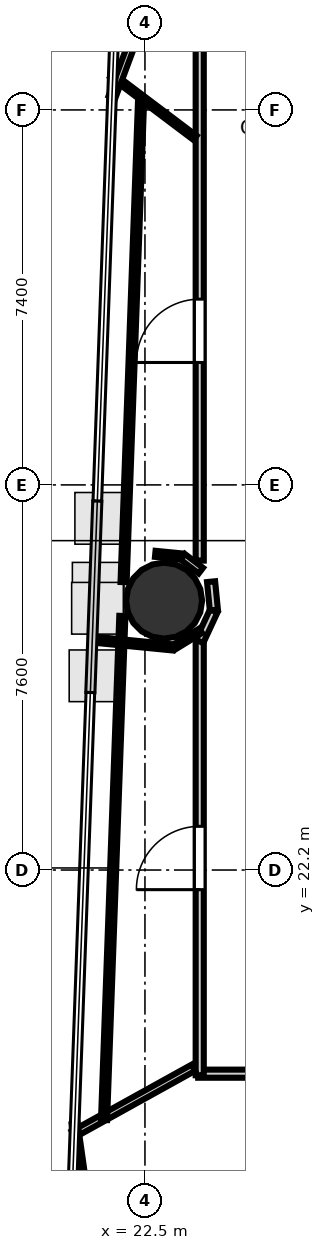
"""IFC4 building model, lengths in metres.
Left out: names, types, materials, properties, quantities, classifications, styles, units other than length and angle.
Written with IfcOpenShell. Run it as: python <this file> out.ifc"""

import sys

from ifc_helpers import new_model, si_unit, direction, frame, frame_2d, origin, origin_2d, place, context, subcontext, project, spatial, rectangle, hollow_circle, extrude, element, fill, save


model = new_model("IFC4")
c1 = context("Model", 3, precision=1e-05, world=origin(), true_north=direction((0.0, 1.0)))
c2 = subcontext(c1, "Body", "Model", "MODEL_VIEW")
j1 = project(units=[si_unit("LENGTHUNIT", "METRE"), si_unit("PLANEANGLEUNIT", "RADIAN")], contexts=[c1])
p1 = place(None, origin())
s1 = spatial("IfcSite", under=j1, at=p1, CompositionType="ELEMENT")
p2 = place(p1, origin())
s2 = spatial("IfcBuilding", under=s1, at=p2, CompositionType="ELEMENT")
p3 = place(p2, frame((0.0, 0.0, 134.8)))
s3 = spatial("IfcBuildingStorey", under=s2, at=p3, CompositionType="ELEMENT", Elevation=134.8)
p4 = place(p3, frame((22.878, 27.516, 0.0), z_axis=(0.0, 0.0, 1.0), x_axis=(1.0, 0.0, 0.0)))
e1 = element("IfcColumn", 1, at=p4, inside=s3, PredefinedType="COLUMN", context=c2, shape_type="SweptSolid", body=[
    extrude(hollow_circle(Radius=0.75, WallThickness=0.036, at=origin_2d()), origin(), (0.0, 0.0, 1.0), 3.7),
])
p5 = place(p3, frame((23.581, 28.307, 0.0), z_axis=(0.0, 0.0, 1.0), x_axis=(0.0, 1.0, 0.0)))
e2 = element("IfcWall", 2, at=p5, inside=s3, PredefinedType="PARTITIONING", context=c2, shape_type="SweptSolid", body=[
    extrude(rectangle(XDim=11.481, YDim=0.16, at=frame_2d((5.741, 0.0))), origin(), (0.0, 0.0, 1.0), 2.72),
])
p6 = place(p5, frame((3.909, 0.0, 0.0)))
e3 = element("IfcOpeningElement", 3, at=p6, cuts=e2, PredefinedType="OPENING", context=c2, shape_type="SweptSolid", body=[
    extrude(rectangle(XDim=1.25, YDim=2.2, at=frame_2d((0.625, 1.1))), frame((0.0, 0.09, 0.0), z_axis=(0.0, -1.0, 0.0), x_axis=(1.0, 0.0, 0.0)), (0.0, 0.0, 1.0), 0.18),
])
p7 = place(p3, frame((33.32, 18.181, 0.0), z_axis=(0.0, 0.0, 1.0), x_axis=(-1.0, 0.0, 0.0)))
e4 = element("IfcWall", 4, at=p7, inside=s3, PredefinedType="PARTITIONING", context=c2, shape_type="SweptSolid", body=[
    extrude(rectangle(XDim=9.77, YDim=0.16, at=frame_2d((4.885, 0.0))), origin(), (0.0, 0.0, 1.0), 2.72),
])
p8 = place(p7, frame((5.52, 0.0, 0.0)))
e5 = element("IfcOpeningElement", 5, at=p8, cuts=e4, PredefinedType="OPENING", context=c2, shape_type="SweptSolid", body=[
    extrude(rectangle(XDim=1.25, YDim=2.2, at=frame_2d((0.625, 1.1))), frame((0.0, 0.09, 0.0), z_axis=(0.0, -1.0, 0.0), x_axis=(1.0, 0.0, 0.0)), (0.0, 0.0, 1.0), 0.18),
])
p9 = place(p3, frame((23.581, 18.15, 0.0), z_axis=(0.0, 0.0, 1.0), x_axis=(0.0, 1.0, 0.0)))
e6 = element("IfcWall", 6, at=p9, inside=s3, PredefinedType="PARTITIONING", context=c2, shape_type="SweptSolid", body=[
    extrude(rectangle(XDim=8.575, YDim=0.16, at=frame_2d((4.288, 0.0))), origin(), (0.0, 0.0, 1.0), 2.72),
])
p10 = place(p9, frame((3.663, 0.0, 0.0)))
e7 = element("IfcOpeningElement", 7, at=p10, cuts=e6, PredefinedType="OPENING", context=c2, shape_type="SweptSolid", body=[
    extrude(rectangle(XDim=1.25, YDim=2.2, at=frame_2d((0.625, 1.1))), frame((0.0, 0.09, 0.0), z_axis=(0.0, -1.0, 0.0), x_axis=(1.0, 0.0, 0.0)), (0.0, 0.0, 1.0), 0.18),
])
p11 = place(p3, frame((23.578, 26.712, 0.0), z_axis=(0.0, 0.0, 1.0), x_axis=(0.421251946418, 0.906943657367, 0.0)))
e8 = element("IfcWall", 8, at=p11, inside=s3, PredefinedType="PARTITIONING", context=c2, shape_type="SweptSolid", body=[
    extrude(rectangle(XDim=0.663, YDim=0.16, at=frame_2d((0.332, 0.0))), origin(), (0.0, 0.0, 1.0), 2.72),
])
p12 = place(p3, frame((23.86, 27.33, 0.0), z_axis=(0.0, 0.0, 1.0), x_axis=(-0.098000919071, 0.995186324193, 0.0)))
e9 = element("IfcWall", 9, at=p12, inside=s3, PredefinedType="PARTITIONING", context=c2, shape_type="SweptSolid", body=[
    extrude(rectangle(XDim=0.563, YDim=0.16, at=frame_2d((0.281, 0.0))), origin(), (0.0, 0.0, 1.0), 2.72),
])
p13 = place(p3, frame((23.455, 18.298, 0.0), z_axis=(0.0, 0.0, 1.0), x_axis=(-0.874671872236, -0.484715499977, 0.0)))
e10 = element("IfcWall", 10, at=p13, inside=s3, PredefinedType="PARTITIONING", context=c2, shape_type="SweptSolid", body=[
    extrude(rectangle(XDim=2.705, YDim=0.14, at=frame_2d((1.353, 0.0))), origin(), (0.0, 0.0, 1.0), 2.72),
])
p14 = place(p3, frame((21.693, 17.268, 0.0), z_axis=(0.0, 0.0, 1.0), x_axis=(0.036303985609, 0.999340793038, 0.0)))
e11 = element("IfcWall", 11, at=p14, inside=s3, PredefinedType="PARTITIONING", context=c2, shape_type="SweptSolid", body=[
    extrude(rectangle(XDim=9.953, YDim=0.12, at=frame_2d((4.977, 0.0))), origin(), (0.0, 0.0, 1.0), 2.72),
])
p15 = place(p3, frame((21.441, 26.751, 0.0), z_axis=(0.0, 0.0, 1.0), x_axis=(0.995173548937, -0.09813056352, 0.0)))
e12 = element("IfcWall", 12, at=p15, inside=s3, PredefinedType="PARTITIONING", context=c2, shape_type="SweptSolid", body=[
    extrude(rectangle(XDim=1.62, YDim=0.12, at=frame_2d((0.81, 0.0))), origin(), (0.0, 0.0, 1.0), 2.72),
])
p16 = place(p3, frame((23.072, 26.597, 0.0), z_axis=(0.0, 0.0, 1.0), x_axis=(0.851779925453, 0.523899760064, 0.0)))
e13 = element("IfcWall", 13, at=p16, inside=s3, PredefinedType="PARTITIONING", context=c2, shape_type="SweptSolid", body=[
    extrude(rectangle(XDim=0.62, YDim=0.105, at=frame_2d((0.31, 0.0))), origin(), (0.0, 0.0, 1.0), 2.72),
])
p17 = place(p3, frame((23.489, 36.65, 0.0), z_axis=(0.0, 0.0, 1.0), x_axis=(-0.798656999973, 0.601786503998, 0.0)))
e14 = element("IfcWall", 14, at=p17, inside=s3, PredefinedType="PARTITIONING", context=c2, shape_type="SweptSolid", body=[
    extrude(rectangle(XDim=2.054, YDim=0.105, at=frame_2d((1.027, 0.0))), origin(), (0.0, 0.0, 1.0), 2.72),
])
p18 = place(p3, frame((21.85, 37.456, 0.0), z_axis=(0.0, 0.0, 1.0), x_axis=(0.348320249102, 0.937375593914, 0.0)))
e15 = element("IfcWall", 15, at=p18, inside=s3, PredefinedType="PARTITIONING", context=c2, shape_type="SweptSolid", body=[
    extrude(rectangle(XDim=1.833, YDim=0.14, at=frame_2d((0.917, 0.0))), origin(), (0.0, 0.0, 1.0), 2.72),
])
p19 = place(p3, frame((23.603, 28.108, 0.0), z_axis=(0.0, 0.0, 1.0), x_axis=(-0.794373213153, 0.607429994505, 0.0)))
e16 = element("IfcWall", 16, at=p19, inside=s3, PredefinedType="PARTITIONING", context=c2, shape_type="SweptSolid", body=[
    extrude(rectangle(XDim=0.45, YDim=0.14, at=frame_2d((0.225, 0.0))), origin(), (0.0, 0.0, 1.0), 2.72),
])
p20 = place(p3, frame((23.229, 28.388, 0.0), z_axis=(0.0, 0.0, 1.0), x_axis=(-0.995187070607, 0.097993339047, 0.0)))
e17 = element("IfcWall", 17, at=p20, inside=s3, PredefinedType="PARTITIONING", context=c2, shape_type="SweptSolid", body=[
    extrude(rectangle(XDim=0.528, YDim=0.12, at=frame_2d((0.264, 0.0))), origin(), (0.0, 0.0, 1.0), 2.72),
])
p21 = place(p3, frame((22.078, 27.882, 0.0), z_axis=(0.0, 0.0, 1.0), x_axis=(0.036297429343, 0.999341031192, 0.0)))
e18 = element("IfcWall", 18, at=p21, inside=s3, PredefinedType="PARTITIONING", context=c2, shape_type="SweptSolid", body=[
    extrude(rectangle(XDim=9.457, YDim=0.12, at=frame_2d((4.729, 0.0))), origin(), (0.0, 0.0, 1.0), 2.72),
])
p22 = place(p3, frame((21.572, 13.949, 0.0), z_axis=(0.0, 0.0, 1.0), x_axis=(-0.140136959189, 0.990132128895, 0.0)))
e19 = element("IfcWall", 19, at=p22, inside=s3, PredefinedType="PARTITIONING", context=c2, shape_type="SweptSolid", body=[
    extrude(rectangle(XDim=3.273, YDim=0.12, at=frame_2d((1.637, 0.0))), origin(), (0.0, 0.0, 1.0), 2.72),
])
p23 = place(p10, origin())
e20 = element("IfcDoor", 20, at=p23, inside=s3, OperationType="SINGLE_SWING_LEFT", PredefinedType="DOOR", context=c2, shape_type="SweptSolid", body=[
    extrude(rectangle(XDim=1.25, YDim=2.2, at=frame_2d((0.625, 1.1))), frame((0.0, 0.025, 0.0), z_axis=(0.0, -1.0, 0.0), x_axis=(1.0, 0.0, 0.0)), (0.0, 0.0, 1.0), 0.05),
])
fill(e7, e20)
p24 = place(p6, origin())
e21 = element("IfcDoor", 21, at=p24, inside=s3, OperationType="SINGLE_SWING_LEFT", PredefinedType="DOOR", context=c2, shape_type="SweptSolid", body=[
    extrude(rectangle(XDim=1.25, YDim=2.2, at=frame_2d((0.625, 1.1))), frame((0.0, 0.025, 0.0), z_axis=(0.0, -1.0, 0.0), x_axis=(1.0, 0.0, 0.0)), (0.0, 0.0, 1.0), 0.05),
])
fill(e3, e21)
save(model, sys.argv[1])
